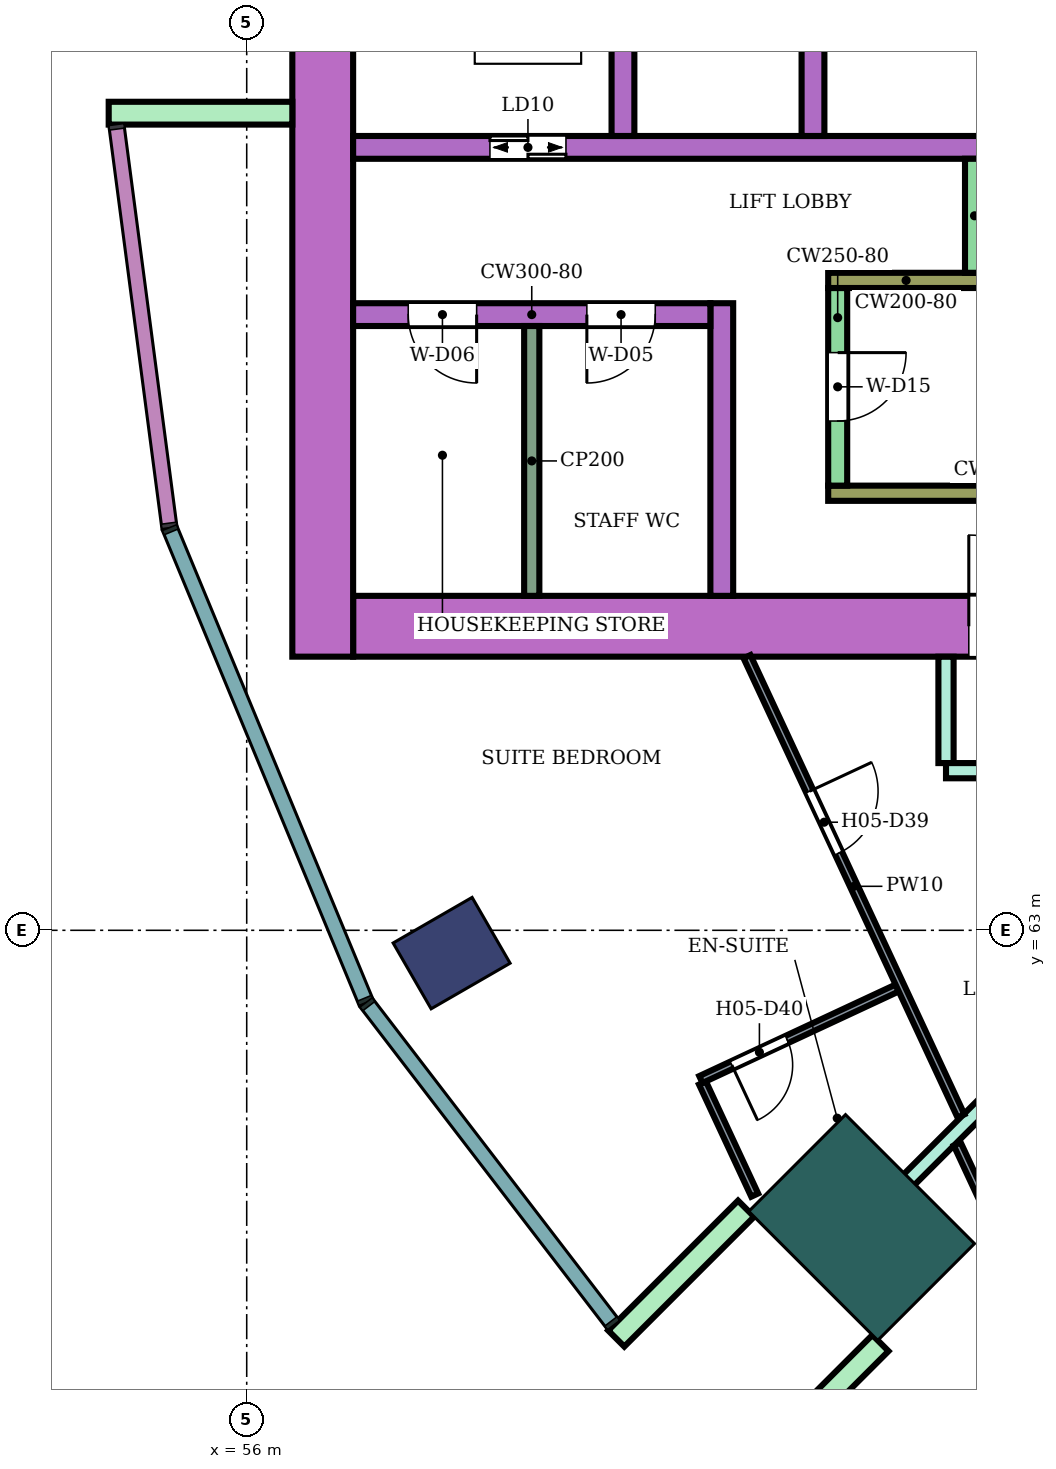
"""IFC4 building model, lengths in metres.
Left out: names, types, materials, properties, quantities, classifications, styles, units other than length and angle.
Written with IfcOpenShell. Run it as: python <this file> out.ifc"""

import sys

from ifc_helpers import new_model, si_unit, direction, frame, frame_2d, origin, origin_2d, place, context, subcontext, project, spatial, rectangle, extrude, element, fill, save


model = new_model("IFC4")
c1 = context("Model", 3, precision=1e-05, world=origin(), true_north=direction((0.0, 1.0)))
c2 = subcontext(c1, "Body", "Model", "MODEL_VIEW")
j1 = project(units=[si_unit("LENGTHUNIT", "METRE"), si_unit("PLANEANGLEUNIT", "RADIAN")], contexts=[c1])
p1 = place(None, origin())
s1 = spatial("IfcSite", under=j1, at=p1, CompositionType="ELEMENT")
p2 = place(p1, origin())
s2 = spatial("IfcBuilding", under=s1, at=p2, CompositionType="ELEMENT")
p3 = place(p2, frame((0.0, 0.0, 82.4)))
s3 = spatial("IfcBuildingStorey", under=s2, at=p3, CompositionType="ELEMENT", Elevation=82.4)
p4 = place(p3, frame((58.696, 62.7, 0.0), z_axis=(0.0, 0.0, 1.0), x_axis=(-0.866025403784, -0.5, 0.0)))
e1 = element("IfcColumn", 1, at=p4, inside=s3, PredefinedType="COLUMN", context=c2, shape_type="SweptSolid", body=[
    extrude(rectangle(XDim=1.2, YDim=1.0, at=origin_2d()), origin(), (0.0, 0.0, 1.0), 3.8),
])
p5 = place(p3, frame((64.09, 59.09, 0.0), z_axis=(0.0, 0.0, 1.0), x_axis=(-0.707106781187, -0.707106781187, 0.0)))
e2 = element("IfcColumn", 2, at=p5, inside=s3, PredefinedType="COLUMN", context=c2, shape_type="SweptSolid", body=[
    extrude(rectangle(XDim=1.8, YDim=2.4, at=origin_2d()), origin(), (0.0, 0.0, 1.0), 3.8),
])
p6 = place(p3, frame((72.1, 67.0, 0.0), z_axis=(0.0, 0.0, 1.0), x_axis=(-1.0, 0.0, 0.0)))
e3 = element("IfcWall", 3, at=p6, inside=s3, PredefinedType="SHEAR", context=c2, shape_type="SweptSolid", body=[
    extrude(rectangle(XDim=14.7, YDim=0.8, at=frame_2d((7.35, 0.0))), origin(), (0.0, 0.0, 1.0), 3.48),
])
p7 = place(p6, frame((4.2, 0.0, 0.0)))
e4 = element("IfcOpeningElement", 4, at=p7, cuts=e3, PredefinedType="OPENING", context=c2, shape_type="SweptSolid", body=[
    extrude(rectangle(XDim=2.4, YDim=2.4, at=frame_2d((1.2, 1.2))), frame((0.0, 0.41, 0.0), z_axis=(0.0, -1.0, 0.0), x_axis=(1.0, 0.0, 0.0)), (0.0, 0.0, 1.0), 0.82),
])
p8 = place(p3, frame((57.0, 83.4, 0.0), z_axis=(0.0, 0.0, 1.0), x_axis=(0.0, -1.0, 0.0)))
e5 = element("IfcWall", 5, at=p8, inside=s3, PredefinedType="SHEAR", context=c2, shape_type="SweptSolid", body=[
    extrude(rectangle(XDim=16.8, YDim=0.8, at=frame_2d((8.4, 0.0))), origin(), (0.0, 0.0, 1.0), 3.48),
])
p9 = place(p3, frame((68.3, 73.3, 0.0), z_axis=(0.0, 0.0, 1.0), x_axis=(-1.0, 0.0, 0.0)))
e6 = element("IfcWall", 6, at=p9, inside=s3, PredefinedType="SHEAR", context=c2, shape_type="SweptSolid", body=[
    extrude(rectangle(XDim=10.9, YDim=0.3, at=frame_2d((5.45, 0.0))), origin(), (0.0, 0.0, 1.0), 3.48),
])
p10 = place(p9, frame((0.55, 0.0, 0.0)))
e7 = element("IfcOpeningElement", 7, at=p10, cuts=e6, PredefinedType="OPENING", context=c2, shape_type="SweptSolid", body=[
    extrude(rectangle(XDim=1.1, YDim=2.1, at=frame_2d((0.55, 1.05))), frame((0.0, 0.16, 0.0), z_axis=(0.0, -1.0, 0.0), x_axis=(1.0, 0.0, 0.0)), (0.0, 0.0, 1.0), 0.32),
])
p11 = place(p9, frame((8.1, 0.0, 0.0)))
e8 = element("IfcOpeningElement", 8, at=p11, cuts=e6, PredefinedType="OPENING", context=c2, shape_type="SweptSolid", body=[
    extrude(rectangle(XDim=1.0, YDim=2.1, at=frame_2d((0.5, 1.05))), frame((0.0, 0.16, 0.0), z_axis=(0.0, -1.0, 0.0), x_axis=(1.0, 0.0, 0.0)), (0.0, 0.0, 1.0), 0.32),
])
for number, where, z_axis, x_axis in (
    (9, (63.45, 76.0, 0.0), (0.0, 0.0, 1.0), (0.0, -1.0, 0.0)),
    (10, (60.95, 76.0, 0.0), (0.0, 0.0, 1.0), (0.0, -1.0, 0.0)),
):
    element("IfcWall", number, at=place(p3, frame(where, z_axis=z_axis, x_axis=x_axis)), inside=s3, PredefinedType="SHEAR", context=c2, shape_type="SweptSolid", body=[
        extrude(rectangle(XDim=2.55, YDim=0.3, at=frame_2d((1.275, 0.0))), origin(), (0.0, 0.0, 1.0), 3.48),
    ])
p12 = place(p3, frame((68.3, 68.75, 0.0), z_axis=(0.0, 0.0, 1.0), x_axis=(-1.0, 0.0, 0.0)))
e11 = element("IfcWall", 11, at=p12, inside=s3, PredefinedType="SHEAR", context=c2, shape_type="SweptSolid", body=[
    extrude(rectangle(XDim=4.65, YDim=0.2, at=frame_2d((2.325, 0.0))), origin(), (0.0, 0.0, 1.0), 3.48),
])
p13 = place(p3, frame((63.775, 71.45, 0.0), z_axis=(0.0, 0.0, 1.0), x_axis=(0.0, -1.0, 0.0)))
e12 = element("IfcWall", 12, at=p13, inside=s3, PredefinedType="SHEAR", context=c2, shape_type="SweptSolid", body=[
    extrude(rectangle(XDim=2.6, YDim=0.25, at=frame_2d((1.3, 0.0))), origin(), (0.0, 0.0, 1.0), 3.48),
])
p14 = place(p13, frame((0.85, 0.0, 0.0)))
e13 = element("IfcOpeningElement", 13, at=p14, cuts=e12, PredefinedType="OPENING", context=c2, shape_type="SweptSolid", body=[
    extrude(rectangle(XDim=0.9, YDim=2.1, at=frame_2d((0.45, 1.05))), frame((0.0, 0.135, 0.0), z_axis=(0.0, -1.0, 0.0), x_axis=(1.0, 0.0, 0.0)), (0.0, 0.0, 1.0), 0.27),
])
p15 = place(p3, frame((65.7, 71.55, 0.0), z_axis=(0.0, 0.0, 1.0), x_axis=(-1.0, 0.0, 0.0)))
e14 = element("IfcWall", 14, at=p15, inside=s3, PredefinedType="SHEAR", context=c2, shape_type="SweptSolid", body=[
    extrude(rectangle(XDim=2.05, YDim=0.2, at=frame_2d((1.025, 0.0))), origin(), (0.0, 0.0, 1.0), 3.48),
])
p16 = place(p3, frame((65.575, 73.15, 0.0), z_axis=(0.0, 0.0, 1.0), x_axis=(0.0, -1.0, 0.0)))
e15 = element("IfcWall", 15, at=p16, inside=s3, PredefinedType="SHEAR", context=c2, shape_type="SweptSolid", body=[
    extrude(rectangle(XDim=1.5, YDim=0.25, at=frame_2d((0.75, 0.0))), origin(), (0.0, 0.0, 1.0), 3.48),
])
p17 = place(p3, frame((62.25, 71.25, 0.0), z_axis=(0.0, 0.0, 1.0), x_axis=(0.0, -1.0, 0.0)))
e16 = element("IfcWall", 16, at=p17, inside=s3, PredefinedType="SHEAR", context=c2, shape_type="SweptSolid", body=[
    extrude(rectangle(XDim=3.85, YDim=0.3, at=frame_2d((1.925, 0.0))), origin(), (0.0, 0.0, 1.0), 3.48),
])
p18 = place(p3, frame((62.1, 71.1, 0.0), z_axis=(0.0, 0.0, 1.0), x_axis=(-1.0, 0.0, 0.0)))
e17 = element("IfcWall", 17, at=p18, inside=s3, PredefinedType="SHEAR", context=c2, shape_type="SweptSolid", body=[
    extrude(rectangle(XDim=4.7, YDim=0.3, at=frame_2d((2.35, 0.0))), origin(), (0.0, 0.0, 1.0), 3.48),
])
p19 = place(p18, frame((0.725, 0.0, 0.0)))
e18 = element("IfcOpeningElement", 18, at=p19, cuts=e17, PredefinedType="OPENING", context=c2, shape_type="SweptSolid", body=[
    extrude(rectangle(XDim=0.9, YDim=2.1, at=frame_2d((0.45, 1.05))), frame((0.0, 0.16, 0.0), z_axis=(0.0, -1.0, 0.0), x_axis=(1.0, 0.0, 0.0)), (0.0, 0.0, 1.0), 0.32),
])
p20 = place(p18, frame((3.075, 0.0, 0.0)))
e19 = element("IfcOpeningElement", 19, at=p20, cuts=e17, PredefinedType="OPENING", context=c2, shape_type="SweptSolid", body=[
    extrude(rectangle(XDim=0.9, YDim=2.1, at=frame_2d((0.45, 1.05))), frame((0.0, 0.16, 0.0), z_axis=(0.0, -1.0, 0.0), x_axis=(1.0, 0.0, 0.0)), (0.0, 0.0, 1.0), 0.32),
])
for number, where, z_axis, x_axis in (
    (20, (56.6, 73.75, 0.0), (0.0, 0.0, 1.0), (-1.0, 0.0, 0.0)),
    (21, (62.57, 59.338, 0.0), (0.0, 0.0, 1.0), (-0.707, -0.707, 0.0)),
    (22, (64.338, 57.57, 0.0), (0.0, 0.0, 1.0), (-0.707, -0.707, 0.0)),
):
    element("IfcWall", number, at=place(p3, frame(where, z_axis=z_axis, x_axis=x_axis)), inside=s3, PredefinedType="NOTDEFINED", context=c2, shape_type="SweptSolid", body=[
        extrude(rectangle(XDim=2.416, YDim=0.3, at=frame_2d((1.208, 0.0))), origin(), (0.0, 0.0, 1.0), 3.8),
    ])
p21 = place(p3, frame((63.593, 58.599, 0.0), z_axis=(0.0, 0.0, 1.0), x_axis=(0.707292874152, 0.706920639233, 0.0)))
e23 = element("IfcWall", 23, at=p21, inside=s3, PredefinedType="PARTITIONING", context=c2, shape_type="SweptSolid", body=[
    extrude(rectangle(XDim=5.247, YDim=0.2, at=frame_2d((2.624, 0.0))), origin(), (0.0, 0.0, 1.0), 3.35),
])
p22 = place(p3, frame((65.2, 65.2, 0.0), z_axis=(0.0, 0.0, 1.0), x_axis=(0.0, 1.0, 0.0)))
e24 = element("IfcWall", 24, at=p22, inside=s3, PredefinedType="PARTITIONING", context=c2, shape_type="SweptSolid", body=[
    extrude(rectangle(XDim=1.399, YDim=0.2, at=frame_2d((0.7, 0.0))), origin(), (0.0, 0.0, 1.0), 3.35),
])
p23 = place(p3, frame((65.2, 65.1, 0.0), z_axis=(0.0, 0.0, 1.0), x_axis=(1.0, 0.0, 0.0)))
e25 = element("IfcWall", 25, at=p23, inside=s3, PredefinedType="PARTITIONING", context=c2, shape_type="SweptSolid", body=[
    extrude(rectangle(XDim=0.859, YDim=0.2, at=frame_2d((0.43, 0.0))), origin(), (0.0, 0.0, 1.0), 3.35),
])
p24 = place(p3, frame((61.996, 60.992, 0.0), z_axis=(0.0, 0.0, 1.0), x_axis=(0.422318684634, -0.906447421867, 0.0)))
e26 = element("IfcWall", 26, at=p24, inside=s3, PredefinedType="PARTITIONING", context=c2, shape_type="SweptSolid", body=[
    extrude(rectangle(XDim=1.627, YDim=0.1, at=frame_2d((0.814, 0.0))), origin(), (0.0, 0.0, 1.0), 3.35),
])
p25 = place(p3, frame((61.975, 61.037, 0.0), z_axis=(0.0, 0.0, 1.0), x_axis=(0.906360368959, 0.422505481125, 0.0)))
e27 = element("IfcWall", 27, at=p25, inside=s3, PredefinedType="PARTITIONING", context=c2, shape_type="SweptSolid", body=[
    extrude(rectangle(XDim=2.849, YDim=0.1, at=frame_2d((1.425, 0.0))), origin(), (0.0, 0.0, 1.0), 3.35),
])
p26 = place(p25, frame((0.45, 0.0, 0.0)))
e28 = element("IfcOpeningElement", 28, at=p26, cuts=e27, PredefinedType="OPENING", context=c2, shape_type="SweptSolid", body=[
    extrude(rectangle(XDim=0.8, YDim=2.1, at=frame_2d((0.4, 1.05))), frame((0.0, 0.06, 0.0), z_axis=(0.0, -1.0, 0.0), x_axis=(1.0, 0.0, 0.0)), (0.0, 0.0, 1.0), 0.12),
])
p27 = place(p3, frame((62.582, 66.6, 0.0), z_axis=(0.0, 0.0, 1.0), x_axis=(0.422283870085, -0.906463641337, 0.0)))
e29 = element("IfcWall", 29, at=p27, inside=s3, PredefinedType="PARTITIONING", context=c2, shape_type="SweptSolid", body=[
    extrude(rectangle(XDim=6.666, YDim=0.1, at=frame_2d((3.333, 0.0))), origin(), (0.0, 0.0, 1.0), 3.35),
])
p28 = place(p27, frame((1.953, 0.0, 0.0)))
e30 = element("IfcOpeningElement", 30, at=p28, cuts=e29, PredefinedType="OPENING", context=c2, shape_type="SweptSolid", body=[
    extrude(rectangle(XDim=0.9, YDim=2.1, at=frame_2d((0.45, 1.05))), frame((0.0, 0.06, 0.0), z_axis=(0.0, -1.0, 0.0), x_axis=(1.0, 0.0, 0.0)), (0.0, 0.0, 1.0), 0.12),
])
p29 = place(p3, frame((65.348, 60.188, 0.0), z_axis=(0.0, 0.0, 1.0), x_axis=(0.422387529151, -0.906415343657, 0.0)))
e31 = element("IfcWall", 31, at=p29, inside=s3, PredefinedType="PARTITIONING", context=c2, shape_type="SweptSolid", body=[
    extrude(rectangle(XDim=1.208, YDim=0.1, at=frame_2d((0.604, 0.0))), origin(), (0.0, 0.0, 1.0), 3.35),
])
p30 = place(p3, frame((59.75, 70.95, 0.0), z_axis=(0.0, 0.0, 1.0), x_axis=(0.0, -1.0, 0.0)))
e32 = element("IfcWall", 32, at=p30, inside=s3, PredefinedType="PARTITIONING", context=c2, shape_type="SweptSolid", body=[
    extrude(rectangle(XDim=3.55, YDim=0.2, at=frame_2d((1.775, 0.0))), origin(), (0.0, 0.0, 1.0), 3.48),
])
p31 = place(p28, origin())
e33 = element("IfcDoor", 33, at=p31, inside=s3, OperationType="SINGLE_SWING_LEFT", PredefinedType="DOOR", context=c2, shape_type="SweptSolid", body=[
    extrude(rectangle(XDim=0.9, YDim=2.1, at=frame_2d((0.45, 1.05))), frame((0.0, 0.025, 0.0), z_axis=(0.0, -1.0, 0.0), x_axis=(1.0, 0.0, 0.0)), (0.0, 0.0, 1.0), 0.05),
])
fill(e30, e33)
p32 = place(p26, frame((0.8, 0.0, 0.0), z_axis=(0.0, 0.0, 1.0), x_axis=(-1.0, 0.0, 0.0)))
e34 = element("IfcDoor", 34, at=p32, inside=s3, OperationType="SINGLE_SWING_RIGHT", PredefinedType="DOOR", context=c2, shape_type="SweptSolid", body=[
    extrude(rectangle(XDim=0.8, YDim=2.1, at=frame_2d((0.4, 1.05))), frame((0.0, 0.025, 0.0), z_axis=(0.0, -1.0, 0.0), x_axis=(1.0, 0.0, 0.0)), (0.0, 0.0, 1.0), 0.05),
])
fill(e28, e34)
p33 = place(p11, origin())
e35 = element("IfcDoor", 35, at=p33, inside=s3, OperationType="DOUBLE_DOOR_SLIDING", PredefinedType="DOOR", context=c2, shape_type="SweptSolid", body=[
    extrude(rectangle(XDim=1.0, YDim=2.1, at=frame_2d((0.5, 1.05))), frame((0.0, 0.025, 0.0), z_axis=(0.0, -1.0, 0.0), x_axis=(1.0, 0.0, 0.0)), (0.0, 0.0, 1.0), 0.05),
])
fill(e8, e35)
p34 = place(p14, origin())
e36 = element("IfcDoor", 36, at=p34, inside=s3, OperationType="SINGLE_SWING_LEFT", PredefinedType="DOOR", context=c2, shape_type="SweptSolid", body=[
    extrude(rectangle(XDim=0.9, YDim=2.1, at=frame_2d((0.45, 1.05))), frame((0.0, 0.025, 0.0), z_axis=(0.0, -1.0, 0.0), x_axis=(1.0, 0.0, 0.0)), (0.0, 0.0, 1.0), 0.05),
])
fill(e13, e36)
p35 = place(p19, origin())
e37 = element("IfcDoor", 37, at=p35, inside=s3, OperationType="SINGLE_SWING_RIGHT", PredefinedType="DOOR", context=c2, shape_type="SweptSolid", body=[
    extrude(rectangle(XDim=0.9, YDim=2.1, at=frame_2d((0.45, 1.05))), frame((0.0, 0.025, 0.0), z_axis=(0.0, -1.0, 0.0), x_axis=(1.0, 0.0, 0.0)), (0.0, 0.0, 1.0), 0.05),
])
fill(e18, e37)
p36 = place(p20, origin())
e38 = element("IfcDoor", 38, at=p36, inside=s3, OperationType="SINGLE_SWING_LEFT", PredefinedType="DOOR", context=c2, shape_type="SweptSolid", body=[
    extrude(rectangle(XDim=0.9, YDim=2.1, at=frame_2d((0.45, 1.05))), frame((0.0, 0.025, 0.0), z_axis=(0.0, -1.0, 0.0), x_axis=(1.0, 0.0, 0.0)), (0.0, 0.0, 1.0), 0.05),
])
fill(e19, e38)
p37 = place(p7, frame((2.4, 0.0, 0.0), z_axis=(0.0, 0.0, 1.0), x_axis=(-1.0, 0.0, 0.0)))
e39 = element("IfcDoor", 39, at=p37, inside=s3, OperationType="DOUBLE_DOOR_SINGLE_SWING", PredefinedType="DOOR", context=c2, shape_type="SweptSolid", body=[
    extrude(rectangle(XDim=2.4, YDim=2.4, at=frame_2d((1.2, 1.2))), frame((0.0, 0.025, 0.0), z_axis=(0.0, -1.0, 0.0), x_axis=(1.0, 0.0, 0.0)), (0.0, 0.0, 1.0), 0.05),
])
fill(e4, e39)
save(model, sys.argv[1])
